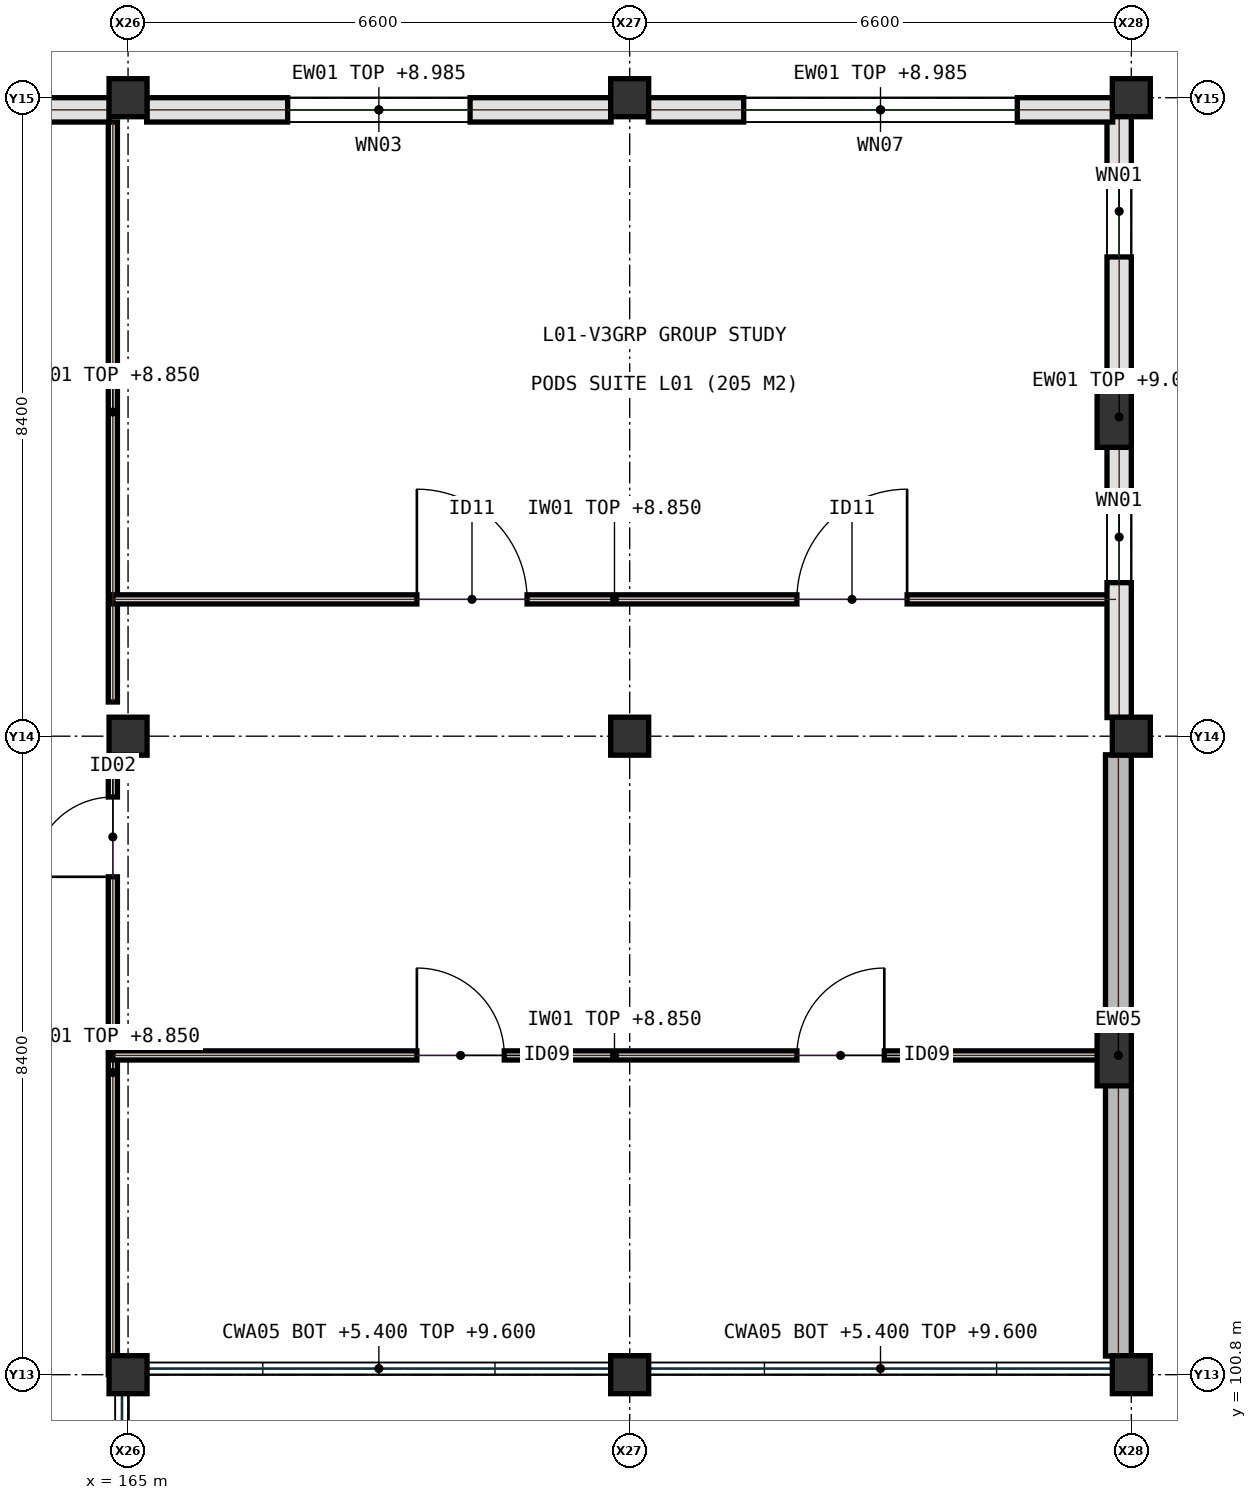
"""IFC4 building model, lengths in metres.
Left out: names, types, materials, properties, quantities, classifications, styles, units other than length and angle.
Written with IfcOpenShell. Run it as: python <this file> out.ifc"""

import sys

from ifc_helpers import new_model, si_unit, direction, frame, frame_2d, origin, origin_2d, place, context, subcontext, project, spatial, rectangle, extrude, element, fill, save


model = new_model("IFC4")
c1 = context("Model", 3, precision=1e-05, world=origin(), true_north=direction((0.0, 1.0)))
c2 = subcontext(c1, "Body", "Model", "MODEL_VIEW")
j1 = project(units=[si_unit("LENGTHUNIT", "METRE"), si_unit("PLANEANGLEUNIT", "RADIAN")], contexts=[c1])
p1 = place(None, origin())
s1 = spatial("IfcSite", under=j1, at=p1, CompositionType="ELEMENT")
p2 = place(p1, origin())
s2 = spatial("IfcBuilding", under=s1, at=p2, CompositionType="ELEMENT")
p3 = place(p2, frame((0.0, 0.0, 5.4)))
s3 = spatial("IfcBuildingStorey", under=s2, at=p3, CompositionType="ELEMENT", Elevation=5.4)
for number, where, z_axis, x_axis in (
    (1, (165.0, 100.8, 0.0), (0.0, 0.0, 1.0), (1.0, 0.0, 0.0)),
    (2, (165.0, 109.2, 0.0), (0.0, 0.0, 1.0), (1.0, 0.0, 0.0)),
    (3, (165.0, 117.6, 0.0), (0.0, 0.0, 1.0), (1.0, 0.0, 0.0)),
    (4, (171.6, 100.8, 0.0), (0.0, 0.0, 1.0), (1.0, 0.0, 0.0)),
    (5, (171.6, 109.2, 0.0), (0.0, 0.0, 1.0), (1.0, 0.0, 0.0)),
    (6, (171.6, 117.6, 0.0), (0.0, 0.0, 1.0), (1.0, 0.0, 0.0)),
    (7, (178.2, 100.8, 0.0), (0.0, 0.0, 1.0), (1.0, 0.0, 0.0)),
    (8, (178.2, 109.2, 0.0), (0.0, 0.0, 1.0), (1.0, 0.0, 0.0)),
    (9, (178.2, 117.6, 0.0), (0.0, 0.0, 1.0), (1.0, 0.0, 0.0)),
):
    element("IfcColumn", number, at=place(p3, frame(where, z_axis=z_axis, x_axis=x_axis)), inside=s3, PredefinedType="COLUMN", context=c2, shape_type="SweptSolid", body=[
        extrude(rectangle(XDim=0.5, YDim=0.5, at=origin_2d()), origin(), (0.0, 0.0, 1.0), 4.5),
    ])
for number, where, z_axis, x_axis in (
    (10, (177.975, 105.0, 0.0), (0.0, 0.0, 1.0), (1.0, 0.0, 0.0)),
    (11, (177.975, 113.4, 0.0), (0.0, 0.0, 1.0), (1.0, 0.0, 0.0)),
):
    element("IfcColumn", number, at=place(p3, frame(where, z_axis=z_axis, x_axis=x_axis)), inside=s3, PredefinedType="PILASTER", context=c2, shape_type="SweptSolid", body=[
        extrude(rectangle(XDim=0.45, YDim=0.8, at=origin_2d()), origin(), (0.0, 0.0, 1.0), 4.5),
    ])
p4 = place(p3, frame((164.8, 100.8, 0.0), z_axis=(0.0, 0.0, 1.0), x_axis=(0.0, 1.0, 0.0)))
e12 = element("IfcWall", 12, at=p4, inside=s3, PredefinedType="PARTITIONING", context=c2, shape_type="SweptSolid", body=[
    extrude(rectangle(XDim=7.95, YDim=0.12, at=frame_2d((3.975, 0.0))), origin(), (0.0, 0.0, 1.0), 3.45),
])
p5 = place(p4, frame((6.55, 0.0, 0.0)))
e13 = element("IfcOpeningElement", 13, at=p5, cuts=e12, PredefinedType="OPENING", context=c2, shape_type="SweptSolid", body=[
    extrude(rectangle(XDim=1.05, YDim=2.15, at=frame_2d((0.525, 1.075))), frame((0.0, 0.07, 0.0), z_axis=(0.0, -1.0, 0.0), x_axis=(1.0, 0.0, 0.0)), (0.0, 0.0, 1.0), 0.14),
])
p6 = place(p3, frame((164.8, 109.65, 0.0), z_axis=(0.0, 0.0, 1.0), x_axis=(0.0, 1.0, 0.0)))
e14 = element("IfcWall", 14, at=p6, inside=s3, PredefinedType="PARTITIONING", context=c2, shape_type="SweptSolid", body=[
    extrude(rectangle(XDim=7.63, YDim=0.12, at=frame_2d((3.815, 0.0))), origin(), (0.0, 0.0, 1.0), 3.45),
])
p7 = place(p3, frame((164.8, 105.0, 0.0), z_axis=(0.0, 0.0, 1.0), x_axis=(1.0, 0.0, 0.0)))
e15 = element("IfcWall", 15, at=p7, inside=s3, PredefinedType="PARTITIONING", context=c2, shape_type="SweptSolid", body=[
    extrude(rectangle(XDim=13.2, YDim=0.12, at=frame_2d((6.6, 0.0))), origin(), (0.0, 0.0, 1.0), 3.45),
])
p8 = place(p7, frame((4.0, 0.0, 0.0)))
e16 = element("IfcOpeningElement", 16, at=p8, cuts=e15, PredefinedType="OPENING", context=c2, shape_type="SweptSolid", body=[
    extrude(rectangle(XDim=1.15, YDim=2.2, at=frame_2d((0.575, 1.1))), frame((0.0, 0.07, 0.0), z_axis=(0.0, -1.0, 0.0), x_axis=(1.0, 0.0, 0.0)), (0.0, 0.0, 1.0), 0.14),
])
p9 = place(p7, frame((9.0, 0.0, 0.0)))
e17 = element("IfcOpeningElement", 17, at=p9, cuts=e15, PredefinedType="OPENING", context=c2, shape_type="SweptSolid", body=[
    extrude(rectangle(XDim=1.15, YDim=2.2, at=frame_2d((0.575, 1.1))), frame((0.0, 0.07, 0.0), z_axis=(0.0, -1.0, 0.0), x_axis=(1.0, 0.0, 0.0)), (0.0, 0.0, 1.0), 0.14),
])
p10 = place(p3, frame((164.8, 111.0, 0.0), z_axis=(0.0, 0.0, 1.0), x_axis=(1.0, 0.0, 0.0)))
e18 = element("IfcWall", 18, at=p10, inside=s3, PredefinedType="PARTITIONING", context=c2, shape_type="SweptSolid", body=[
    extrude(rectangle(XDim=13.2, YDim=0.12, at=frame_2d((6.6, 0.0))), origin(), (0.0, 0.0, 1.0), 3.45),
])
p11 = place(p10, frame((4.0, 0.0, 0.0)))
e19 = element("IfcOpeningElement", 19, at=p11, cuts=e18, PredefinedType="OPENING", context=c2, shape_type="SweptSolid", body=[
    extrude(rectangle(XDim=1.45, YDim=2.25, at=frame_2d((0.725, 1.125))), frame((0.0, 0.07, 0.0), z_axis=(0.0, -1.0, 0.0), x_axis=(1.0, 0.0, 0.0)), (0.0, 0.0, 1.0), 0.14),
])
p12 = place(p10, frame((9.0, 0.0, 0.0)))
e20 = element("IfcOpeningElement", 20, at=p12, cuts=e18, PredefinedType="OPENING", context=c2, shape_type="SweptSolid", body=[
    extrude(rectangle(XDim=1.45, YDim=2.25, at=frame_2d((0.725, 1.125))), frame((0.0, 0.07, 0.0), z_axis=(0.0, -1.0, 0.0), x_axis=(1.0, 0.0, 0.0)), (0.0, 0.0, 1.0), 0.14),
])
p13 = place(p3, frame((164.755, 117.44, 0.0), z_axis=(0.0, 0.0, 1.0), x_axis=(-1.0, 0.0, 0.0)))
e21 = element("IfcWall", 21, at=p13, inside=s3, PredefinedType="SOLIDWALL", context=c2, shape_type="SweptSolid", body=[
    extrude(rectangle(XDim=6.11, YDim=0.32, at=frame_2d((3.055, 0.0))), origin(), (0.0, 0.0, 1.0), 3.585),
])
p14 = place(p13, frame((1.905, 0.0, 0.95)))
e22 = element("IfcOpeningElement", 22, at=p14, cuts=e21, PredefinedType="OPENING", context=c2, shape_type="SweptSolid", body=[
    extrude(rectangle(XDim=2.3, YDim=1.95, at=frame_2d((1.15, 0.975))), frame((0.0, 0.17, 0.0), z_axis=(0.0, -1.0, 0.0), x_axis=(1.0, 0.0, 0.0)), (0.0, 0.0, 1.0), 0.34),
])
p15 = place(p3, frame((171.355, 117.44, 0.0), z_axis=(0.0, 0.0, 1.0), x_axis=(-1.0, 0.0, 0.0)))
e23 = element("IfcWall", 23, at=p15, inside=s3, PredefinedType="SOLIDWALL", context=c2, shape_type="SweptSolid", body=[
    extrude(rectangle(XDim=6.11, YDim=0.32, at=frame_2d((3.055, 0.0))), origin(), (0.0, 0.0, 1.0), 3.585),
])
p16 = place(p15, frame((1.855, 0.0, 0.95)))
e24 = element("IfcOpeningElement", 24, at=p16, cuts=e23, PredefinedType="OPENING", context=c2, shape_type="SweptSolid", body=[
    extrude(rectangle(XDim=2.4, YDim=1.6, at=frame_2d((1.2, 0.8))), frame((0.0, 0.17, 0.0), z_axis=(0.0, -1.0, 0.0), x_axis=(1.0, 0.0, 0.0)), (0.0, 0.0, 1.0), 0.34),
])
p17 = place(p3, frame((178.03, 101.045, 0.0), z_axis=(0.0, 0.0, 1.0), x_axis=(0.0, 1.0, 0.0)))
e25 = element("IfcWall", 25, at=p17, inside=s3, PredefinedType="SHEAR", context=c2, shape_type="SweptSolid", body=[
    extrude(rectangle(XDim=7.91, YDim=0.34, at=frame_2d((3.955, 0.0))), origin(), (0.0, 0.0, 1.0), 4.2),
])
p18 = place(p3, frame((178.04, 109.445, 0.0), z_axis=(0.0, 0.0, 1.0), x_axis=(0.0, 1.0, 0.0)))
e26 = element("IfcWall", 26, at=p18, inside=s3, PredefinedType="SOLIDWALL", context=c2, shape_type="SweptSolid", body=[
    extrude(rectangle(XDim=7.91, YDim=0.32, at=frame_2d((3.955, 0.0))), origin(), (0.0, 0.0, 1.0), 3.635),
])
p19 = place(p18, frame((1.775, 0.0, 0.95)))
e27 = element("IfcOpeningElement", 27, at=p19, cuts=e26, PredefinedType="OPENING", context=c2, shape_type="SweptSolid", body=[
    extrude(rectangle(XDim=1.2, YDim=1.5, at=frame_2d((0.6, 0.75))), frame((0.0, 0.17, 0.0), z_axis=(0.0, -1.0, 0.0), x_axis=(1.0, 0.0, 0.0)), (0.0, 0.0, 1.0), 0.34),
])
p20 = place(p18, frame((6.06, 0.0, 0.95)))
e28 = element("IfcOpeningElement", 28, at=p20, cuts=e26, PredefinedType="OPENING", context=c2, shape_type="SweptSolid", body=[
    extrude(rectangle(XDim=1.2, YDim=1.5, at=frame_2d((0.6, 0.75))), frame((0.0, 0.17, 0.0), z_axis=(0.0, -1.0, 0.0), x_axis=(1.0, 0.0, 0.0)), (0.0, 0.0, 1.0), 0.34),
])
p21 = place(p3, frame((177.955, 117.44, 0.0), z_axis=(0.0, 0.0, 1.0), x_axis=(-1.0, 0.0, 0.0)))
e29 = element("IfcWall", 29, at=p21, inside=s3, PredefinedType="SOLIDWALL", context=c2, shape_type="SweptSolid", body=[
    extrude(rectangle(XDim=6.11, YDim=0.32, at=frame_2d((3.055, 0.0))), origin(), (0.0, 0.0, 1.0), 3.585),
])
p22 = place(p21, frame((1.255, 0.0, 0.95)))
e30 = element("IfcOpeningElement", 30, at=p22, cuts=e29, PredefinedType="OPENING", context=c2, shape_type="SweptSolid", body=[
    extrude(rectangle(XDim=3.6, YDim=2.0, at=frame_2d((1.8, 1.0))), frame((0.0, 0.17, 0.0), z_axis=(0.0, -1.0, 0.0), x_axis=(1.0, 0.0, 0.0)), (0.0, 0.0, 1.0), 0.34),
])
p23 = place(p5, origin())
e31 = element("IfcDoor", 31, at=p23, inside=s3, OperationType="SINGLE_SWING_LEFT", PredefinedType="DOOR", context=c2, shape_type="SweptSolid", body=[
    extrude(rectangle(XDim=1.05, YDim=2.15, at=frame_2d((0.525, 1.075))), frame((0.0, 0.025, 0.0), z_axis=(0.0, -1.0, 0.0), x_axis=(1.0, 0.0, 0.0)), (0.0, 0.0, 1.0), 0.05),
])
fill(e13, e31)
p24 = place(p8, origin())
e32 = element("IfcDoor", 32, at=p24, inside=s3, OperationType="SINGLE_SWING_LEFT", PredefinedType="DOOR", context=c2, shape_type="SweptSolid", body=[
    extrude(rectangle(XDim=1.15, YDim=2.2, at=frame_2d((0.575, 1.1))), frame((0.0, 0.025, 0.0), z_axis=(0.0, -1.0, 0.0), x_axis=(1.0, 0.0, 0.0)), (0.0, 0.0, 1.0), 0.05),
])
fill(e16, e32)
p25 = place(p9, origin())
e33 = element("IfcDoor", 33, at=p25, inside=s3, OperationType="SINGLE_SWING_RIGHT", PredefinedType="DOOR", context=c2, shape_type="SweptSolid", body=[
    extrude(rectangle(XDim=1.15, YDim=2.2, at=frame_2d((0.575, 1.1))), frame((0.0, 0.025, 0.0), z_axis=(0.0, -1.0, 0.0), x_axis=(1.0, 0.0, 0.0)), (0.0, 0.0, 1.0), 0.05),
])
fill(e17, e33)
p26 = place(p11, origin())
e34 = element("IfcDoor", 34, at=p26, inside=s3, OperationType="SINGLE_SWING_LEFT", PredefinedType="DOOR", context=c2, shape_type="SweptSolid", body=[
    extrude(rectangle(XDim=1.45, YDim=2.25, at=frame_2d((0.725, 1.125))), frame((0.0, 0.025, 0.0), z_axis=(0.0, -1.0, 0.0), x_axis=(1.0, 0.0, 0.0)), (0.0, 0.0, 1.0), 0.05),
])
fill(e19, e34)
p27 = place(p12, origin())
e35 = element("IfcDoor", 35, at=p27, inside=s3, OperationType="SINGLE_SWING_RIGHT", PredefinedType="DOOR", context=c2, shape_type="SweptSolid", body=[
    extrude(rectangle(XDim=1.45, YDim=2.25, at=frame_2d((0.725, 1.125))), frame((0.0, 0.025, 0.0), z_axis=(0.0, -1.0, 0.0), x_axis=(1.0, 0.0, 0.0)), (0.0, 0.0, 1.0), 0.05),
])
fill(e20, e35)
p28 = place(p16, origin())
e36 = element("IfcWindow", 36, at=p28, inside=s3, PartitioningType="SINGLE_PANEL", PredefinedType="WINDOW", context=c2, shape_type="SweptSolid", body=[
    extrude(rectangle(XDim=2.4, YDim=1.6, at=frame_2d((1.2, 0.8))), frame((0.0, 0.03, 0.0), z_axis=(0.0, -1.0, 0.0), x_axis=(1.0, 0.0, 0.0)), (0.0, 0.0, 1.0), 0.06),
])
fill(e24, e36)
p29 = place(p19, origin())
e37 = element("IfcWindow", 37, at=p29, inside=s3, PartitioningType="SINGLE_PANEL", PredefinedType="WINDOW", context=c2, shape_type="SweptSolid", body=[
    extrude(rectangle(XDim=1.2, YDim=1.5, at=frame_2d((0.6, 0.75))), frame((0.0, 0.03, 0.0), z_axis=(0.0, -1.0, 0.0), x_axis=(1.0, 0.0, 0.0)), (0.0, 0.0, 1.0), 0.06),
])
fill(e27, e37)
p30 = place(p20, origin())
e38 = element("IfcWindow", 38, at=p30, inside=s3, PartitioningType="SINGLE_PANEL", PredefinedType="WINDOW", context=c2, shape_type="SweptSolid", body=[
    extrude(rectangle(XDim=1.2, YDim=1.5, at=frame_2d((0.6, 0.75))), frame((0.0, 0.03, 0.0), z_axis=(0.0, -1.0, 0.0), x_axis=(1.0, 0.0, 0.0)), (0.0, 0.0, 1.0), 0.06),
])
fill(e28, e38)
p31 = place(p22, origin())
e39 = element("IfcWindow", 39, at=p31, inside=s3, PartitioningType="SINGLE_PANEL", PredefinedType="WINDOW", context=c2, shape_type="SweptSolid", body=[
    extrude(rectangle(XDim=3.6, YDim=2.0, at=frame_2d((1.8, 1.0))), frame((0.0, 0.03, 0.0), z_axis=(0.0, -1.0, 0.0), x_axis=(1.0, 0.0, 0.0)), (0.0, 0.0, 1.0), 0.06),
])
fill(e30, e39)
save(model, sys.argv[1])
